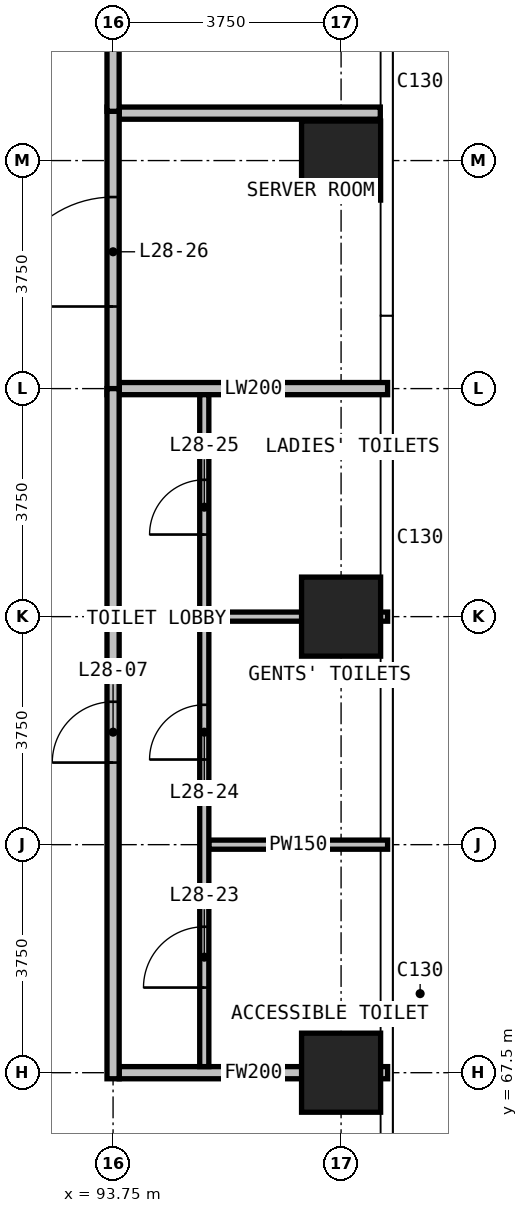
"""IFC4 building model, lengths in metres.
Left out: names, types, materials, properties, quantities, classifications, styles, units other than length and angle.
Written with IfcOpenShell. Run it as: python <this file> out.ifc"""

import sys

from ifc_helpers import new_model, si_unit, direction, frame, frame_2d, origin, origin_2d, place, context, subcontext, project, spatial, rectangle, extrude, element, fill, save


model = new_model("IFC4")
c1 = context("Model", 3, precision=1e-05, world=origin(), true_north=direction((0.0, 1.0)))
c2 = subcontext(c1, "Body", "Model", "MODEL_VIEW")
j1 = project(units=[si_unit("LENGTHUNIT", "METRE"), si_unit("PLANEANGLEUNIT", "RADIAN")], contexts=[c1])
p1 = place(None, origin())
s1 = spatial("IfcSite", under=j1, at=p1, CompositionType="ELEMENT")
p2 = place(p1, origin())
s2 = spatial("IfcBuilding", under=s1, at=p2, CompositionType="ELEMENT")
p3 = place(p2, frame((0.0, 0.0, 114.4)))
s3 = spatial("IfcBuildingStorey", under=s2, at=p3, CompositionType="ELEMENT", Elevation=114.4)
for number, where, z_axis, x_axis in (
    (1, (97.5, 67.5, 0.0), (0.0, 0.0, 1.0), (1.0, 0.0, 0.0)),
    (2, (97.5, 75.0, 0.0), (0.0, 0.0, 1.0), (1.0, 0.0, 0.0)),
    (3, (97.5, 82.5, 0.0), (0.0, 0.0, 1.0), (1.0, 0.0, 0.0)),
):
    element("IfcColumn", number, at=place(p3, frame(where, z_axis=z_axis, x_axis=x_axis)), inside=s3, PredefinedType="COLUMN", context=c2, shape_type="SweptSolid", body=[
        extrude(rectangle(XDim=1.3, YDim=1.3, at=origin_2d()), origin(), (0.0, 0.0, 1.0), 3.6),
    ])
p4 = place(p3, frame((93.85, 78.75, 0.0), z_axis=(0.0, 0.0, 1.0), x_axis=(1.0, 0.0, 0.0)))
e4 = element("IfcWall", 4, at=p4, inside=s3, PredefinedType="PARTITIONING", context=c2, shape_type="SweptSolid", body=[
    extrude(rectangle(XDim=4.415, YDim=0.2, at=frame_2d((2.208, 0.0))), origin(), (0.0, 0.0, 1.0), 3.3),
])
p5 = place(p3, frame((93.85, 83.28, 0.0), z_axis=(0.0, 0.0, 1.0), x_axis=(1.0, 0.0, 0.0)))
e5 = element("IfcWall", 5, at=p5, inside=s3, PredefinedType="PARTITIONING", context=c2, shape_type="SweptSolid", body=[
    extrude(rectangle(XDim=4.295, YDim=0.2, at=frame_2d((2.147, 0.0))), origin(), (0.0, 0.0, 1.0), 3.3),
])
p6 = place(p3, frame((93.75, 78.65, 0.0), z_axis=(0.0, 0.0, 1.0), x_axis=(0.0, 1.0, 0.0)))
e6 = element("IfcWall", 6, at=p6, inside=s3, PredefinedType="PARTITIONING", context=c2, shape_type="SweptSolid", body=[
    extrude(rectangle(XDim=4.73, YDim=0.2, at=frame_2d((2.365, 0.0))), origin(), (0.0, 0.0, 1.0), 3.3),
])
p7 = place(p6, frame((1.45, 0.0, 0.0)))
e7 = element("IfcOpeningElement", 7, at=p7, cuts=e6, PredefinedType="OPENING", context=c2, shape_type="SweptSolid", body=[
    extrude(rectangle(XDim=1.8, YDim=2.4, at=frame_2d((0.9, 1.2))), frame((0.0, 0.11, 0.0), z_axis=(0.0, -1.0, 0.0), x_axis=(1.0, 0.0, 0.0)), (0.0, 0.0, 1.0), 0.22),
])
p8 = place(p3, frame((93.85, 67.5, 0.0), z_axis=(0.0, 0.0, 1.0), x_axis=(1.0, 0.0, 0.0)))
e8 = element("IfcWall", 8, at=p8, inside=s3, PredefinedType="PARTITIONING", context=c2, shape_type="SweptSolid", body=[
    extrude(rectangle(XDim=4.415, YDim=0.2, at=frame_2d((2.208, 0.0))), origin(), (0.0, 0.0, 1.0), 3.3),
])
p9 = place(p3, frame((93.75, 67.4, 0.0), z_axis=(0.0, 0.0, 1.0), x_axis=(0.0, 1.0, 0.0)))
e9 = element("IfcWall", 9, at=p9, inside=s3, PredefinedType="PARTITIONING", context=c2, shape_type="SweptSolid", body=[
    extrude(rectangle(XDim=11.35, YDim=0.2, at=frame_2d((5.675, 0.0))), origin(), (0.0, 0.0, 1.0), 3.3),
])
p10 = place(p9, frame((5.2, 0.0, 0.0)))
e10 = element("IfcOpeningElement", 10, at=p10, cuts=e9, PredefinedType="OPENING", context=c2, shape_type="SweptSolid", body=[
    extrude(rectangle(XDim=1.0, YDim=2.2, at=frame_2d((0.5, 1.1))), frame((0.0, 0.11, 0.0), z_axis=(0.0, -1.0, 0.0), x_axis=(1.0, 0.0, 0.0)), (0.0, 0.0, 1.0), 0.22),
])
p11 = place(p3, frame((93.75, 83.31, 0.0), z_axis=(0.0, 0.0, 1.0), x_axis=(0.0, 1.0, 0.0)))
e11 = element("IfcWall", 11, at=p11, inside=s3, PredefinedType="PARTITIONING", context=c2, shape_type="SweptSolid", body=[
    extrude(rectangle(XDim=7.335, YDim=0.2, at=frame_2d((3.667, 0.0))), origin(), (0.0, 0.0, 1.0), 3.3),
])
for number, where, z_axis, x_axis in (
    (12, (95.325, 71.25, 0.0), (0.0, 0.0, 1.0), (1.0, 0.0, 0.0)),
    (13, (95.325, 75.0, 0.0), (0.0, 0.0, 1.0), (1.0, 0.0, 0.0)),
):
    element("IfcWall", number, at=place(p3, frame(where, z_axis=z_axis, x_axis=x_axis)), inside=s3, PredefinedType="PARTITIONING", context=c2, shape_type="SweptSolid", body=[
        extrude(rectangle(XDim=2.94, YDim=0.15, at=frame_2d((1.47, 0.0))), origin(), (0.0, 0.0, 1.0), 3.3),
    ])
p12 = place(p3, frame((95.25, 67.6, 0.0), z_axis=(0.0, 0.0, 1.0), x_axis=(0.0, 1.0, 0.0)))
e14 = element("IfcWall", 14, at=p12, inside=s3, PredefinedType="PARTITIONING", context=c2, shape_type="SweptSolid", body=[
    extrude(rectangle(XDim=11.05, YDim=0.15, at=frame_2d((5.525, 0.0))), origin(), (0.0, 0.0, 1.0), 3.3),
])
p13 = place(p12, frame((1.3, 0.0, 0.0)))
e15 = element("IfcOpeningElement", 15, at=p13, cuts=e14, PredefinedType="OPENING", context=c2, shape_type="SweptSolid", body=[
    extrude(rectangle(XDim=1.0, YDim=2.2, at=frame_2d((0.5, 1.1))), frame((0.0, 0.085, 0.0), z_axis=(0.0, -1.0, 0.0), x_axis=(1.0, 0.0, 0.0)), (0.0, 0.0, 1.0), 0.17),
])
p14 = place(p12, frame((5.05, 0.0, 0.0)))
e16 = element("IfcOpeningElement", 16, at=p14, cuts=e14, PredefinedType="OPENING", context=c2, shape_type="SweptSolid", body=[
    extrude(rectangle(XDim=0.9, YDim=2.2, at=frame_2d((0.45, 1.1))), frame((0.0, 0.085, 0.0), z_axis=(0.0, -1.0, 0.0), x_axis=(1.0, 0.0, 0.0)), (0.0, 0.0, 1.0), 0.17),
])
p15 = place(p12, frame((8.75, 0.0, 0.0)))
e17 = element("IfcOpeningElement", 17, at=p15, cuts=e14, PredefinedType="OPENING", context=c2, shape_type="SweptSolid", body=[
    extrude(rectangle(XDim=0.9, YDim=2.2, at=frame_2d((0.45, 1.1))), frame((0.0, 0.085, 0.0), z_axis=(0.0, -1.0, 0.0), x_axis=(1.0, 0.0, 0.0)), (0.0, 0.0, 1.0), 0.17),
])
p16 = place(p10, origin())
e18 = element("IfcDoor", 18, at=p16, inside=s3, OperationType="SINGLE_SWING_LEFT", PredefinedType="DOOR", context=c2, shape_type="SweptSolid", body=[
    extrude(rectangle(XDim=1.0, YDim=2.2, at=frame_2d((0.5, 1.1))), frame((0.0, 0.025, 0.0), z_axis=(0.0, -1.0, 0.0), x_axis=(1.0, 0.0, 0.0)), (0.0, 0.0, 1.0), 0.05),
])
fill(e10, e18)
p17 = place(p13, origin())
e19 = element("IfcDoor", 19, at=p17, inside=s3, OperationType="SINGLE_SWING_RIGHT", PredefinedType="DOOR", context=c2, shape_type="SweptSolid", body=[
    extrude(rectangle(XDim=1.0, YDim=2.2, at=frame_2d((0.5, 1.1))), frame((0.0, 0.025, 0.0), z_axis=(0.0, -1.0, 0.0), x_axis=(1.0, 0.0, 0.0)), (0.0, 0.0, 1.0), 0.05),
])
fill(e15, e19)
p18 = place(p14, origin())
e20 = element("IfcDoor", 20, at=p18, inside=s3, OperationType="SINGLE_SWING_LEFT", PredefinedType="DOOR", context=c2, shape_type="SweptSolid", body=[
    extrude(rectangle(XDim=0.9, YDim=2.2, at=frame_2d((0.45, 1.1))), frame((0.0, 0.025, 0.0), z_axis=(0.0, -1.0, 0.0), x_axis=(1.0, 0.0, 0.0)), (0.0, 0.0, 1.0), 0.05),
])
fill(e16, e20)
p19 = place(p15, origin())
e21 = element("IfcDoor", 21, at=p19, inside=s3, OperationType="SINGLE_SWING_LEFT", PredefinedType="DOOR", context=c2, shape_type="SweptSolid", body=[
    extrude(rectangle(XDim=0.9, YDim=2.2, at=frame_2d((0.45, 1.1))), frame((0.0, 0.025, 0.0), z_axis=(0.0, -1.0, 0.0), x_axis=(1.0, 0.0, 0.0)), (0.0, 0.0, 1.0), 0.05),
])
fill(e17, e21)
p20 = place(p7, origin())
e22 = element("IfcDoor", 22, at=p20, inside=s3, OperationType="DOUBLE_DOOR_SINGLE_SWING", PredefinedType="DOOR", context=c2, shape_type="SweptSolid", body=[
    extrude(rectangle(XDim=1.8, YDim=2.4, at=frame_2d((0.9, 1.2))), frame((0.0, 0.025, 0.0), z_axis=(0.0, -1.0, 0.0), x_axis=(1.0, 0.0, 0.0)), (0.0, 0.0, 1.0), 0.05),
])
fill(e7, e22)
save(model, sys.argv[1])
